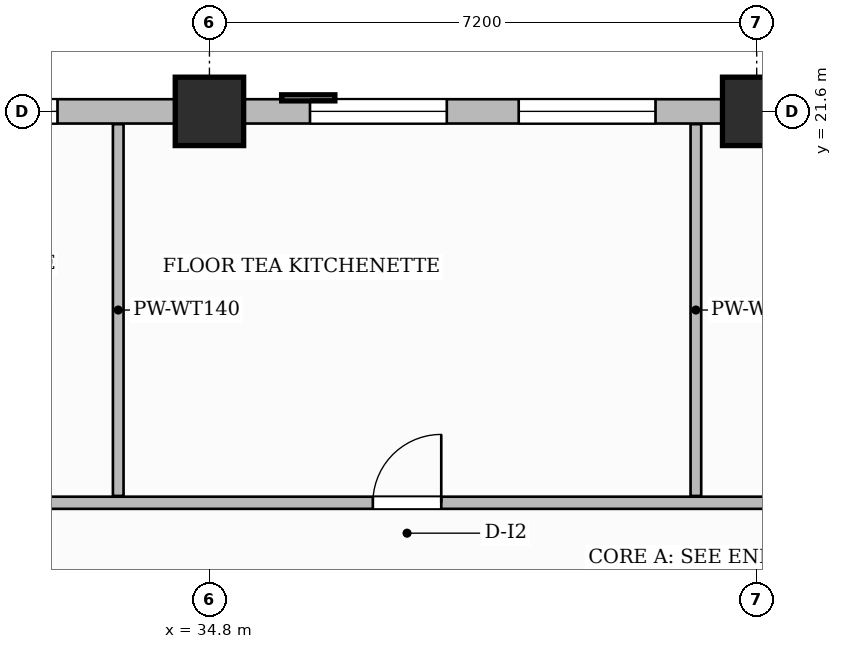
"""IFC4 building model, lengths in metres.
Left out: names, types, materials, properties, quantities, classifications, styles, units other than length and angle.
Written with IfcOpenShell. Run it as: python <this file> out.ifc"""

import sys

from ifc_helpers import new_model, si_unit, direction, frame, frame_2d, origin, origin_2d, place, context, subcontext, project, spatial, rectangle, extrude, source, transform, mapped, element, fill, save


model = new_model("IFC4")
c1 = context("Model", 3, precision=1e-05, world=origin(), true_north=direction((0.0, 1.0)))
c2 = subcontext(c1, "Body", "Model", "MODEL_VIEW")
j1 = project(units=[si_unit("LENGTHUNIT", "METRE"), si_unit("PLANEANGLEUNIT", "RADIAN")], contexts=[c1])
p1 = place(None, origin())
s1 = spatial("IfcSite", under=j1, at=p1, CompositionType="ELEMENT")
p2 = place(p1, origin())
s2 = spatial("IfcBuilding", under=s1, at=p2, CompositionType="ELEMENT")
p3 = place(p2, frame((0.0, 0.0, 248.1)))
s3 = spatial("IfcBuildingStorey", under=s2, at=p3, CompositionType="ELEMENT", Elevation=248.1)
m1 = source(origin(), c2, "Body", "SweptSolid", [
    extrude(rectangle(XDim=0.9, YDim=0.9, at=origin_2d()), origin(), (0.0, 0.0, 1.0), 3.85),
])
for number, where, z_axis, x_axis in (
    (1, (34.8, 21.6, 0.0), (0.0, 0.0, 1.0), (1.0, 0.0, 0.0)),
    (2, (42.0, 21.6, 0.0), (0.0, 0.0, 1.0), (1.0, 0.0, 0.0)),
):
    element("IfcColumn", number, at=place(p3, frame(where, z_axis=z_axis, x_axis=x_axis)), inside=s3, PredefinedType="COLUMN", context=c2, shape_type="MappedRepresentation", body=[
        mapped(m1, transform((0.0, 0.0, 0.0), scale=1.0)),
    ])
p4 = place(p3, frame((30.29, 16.45, 0.0), z_axis=(0.0, 0.0, 1.0), x_axis=(1.0, 0.0, 0.0)))
e3 = element("IfcWall", 3, at=p4, inside=s3, PredefinedType="PARTITIONING", context=c2, shape_type="SweptSolid", body=[
    extrude(rectangle(XDim=19.37, YDim=0.16, at=frame_2d((9.685, 0.0))), origin(), (0.0, 0.0, 1.0), 3.6),
])
p5 = place(p4, frame((1.185, 0.0, 0.0)))
e4 = element("IfcOpeningElement", 4, at=p5, cuts=e3, PredefinedType="OPENING", context=c2, shape_type="SweptSolid", body=[
    extrude(rectangle(XDim=0.85, YDim=2.1, at=frame_2d((0.425, 1.05))), frame((0.0, 0.09, 0.0), z_axis=(0.0, -1.0, 0.0), x_axis=(1.0, 0.0, 0.0)), (0.0, 0.0, 1.0), 0.18),
])
p6 = place(p4, frame((6.66, 0.0, 0.0)))
e5 = element("IfcOpeningElement", 5, at=p6, cuts=e3, PredefinedType="OPENING", context=c2, shape_type="SweptSolid", body=[
    extrude(rectangle(XDim=0.9, YDim=2.15, at=frame_2d((0.45, 1.075))), frame((0.0, 0.09, 0.0), z_axis=(0.0, -1.0, 0.0), x_axis=(1.0, 0.0, 0.0)), (0.0, 0.0, 1.0), 0.18),
])
p7 = place(p4, frame((14.46, 0.0, 0.0)))
e6 = element("IfcOpeningElement", 6, at=p7, cuts=e3, PredefinedType="OPENING", context=c2, shape_type="SweptSolid", body=[
    extrude(rectangle(XDim=1.4, YDim=2.35, at=frame_2d((0.7, 1.175))), frame((0.0, 0.09, 0.0), z_axis=(0.0, -1.0, 0.0), x_axis=(1.0, 0.0, 0.0)), (0.0, 0.0, 1.0), 0.18),
])
for number, where, z_axis, x_axis in (
    (7, (33.6, 16.54, 0.0), (0.0, 0.0, 1.0), (0.0, 1.0, 0.0)),
    (8, (41.2, 16.54, 0.0), (0.0, 0.0, 1.0), (0.0, 1.0, 0.0)),
):
    element("IfcWall", number, at=place(p3, frame(where, z_axis=z_axis, x_axis=x_axis)), inside=s3, PredefinedType="PARTITIONING", context=c2, shape_type="SweptSolid", body=[
        extrude(rectangle(XDim=4.892, YDim=0.14, at=frame_2d((2.446, 0.0))), origin(), (0.0, 0.0, 1.0), 3.6),
    ])
p8 = place(p3, frame((14.4, 21.6, 0.0), z_axis=(0.0, 0.0, 1.0), x_axis=(1.0, 0.0, 0.0)))
e9 = element("IfcWall", 9, at=p8, inside=s3, PredefinedType="SOLIDWALL", context=c2, shape_type="SweptSolid", body=[
    extrude(rectangle(XDim=35.4, YDim=0.32, at=frame_2d((17.7, 0.0))), origin(), (0.0, 0.0, 1.0), 3.135),
])
p9 = place(p8, frame((0.85, 0.0, 0.0)))
e10 = element("IfcOpeningElement", 10, at=p9, cuts=e9, PredefinedType="OPENING", context=c2, shape_type="SweptSolid", body=[
    extrude(rectangle(XDim=1.2, YDim=2.2, at=frame_2d((0.6, 1.1))), frame((0.0, 0.17, 0.0), z_axis=(0.0, -1.0, 0.0), x_axis=(1.0, 0.0, 0.0)), (0.0, 0.0, 1.0), 0.34),
])
p10 = place(p8, frame((2.771, 0.0, 0.8)))
e11 = element("IfcOpeningElement", 11, at=p10, cuts=e9, PredefinedType="OPENING", context=c2, shape_type="SweptSolid", body=[
    extrude(rectangle(XDim=1.4, YDim=1.85, at=frame_2d((0.7, 0.925))), frame((0.0, 0.17, 0.0), z_axis=(0.0, -1.0, 0.0), x_axis=(1.0, 0.0, 0.0)), (0.0, 0.0, 1.0), 0.34),
])
p11 = place(p8, frame((4.929, 0.0, 0.8)))
e12 = element("IfcOpeningElement", 12, at=p11, cuts=e9, PredefinedType="OPENING", context=c2, shape_type="SweptSolid", body=[
    extrude(rectangle(XDim=1.15, YDim=1.8, at=frame_2d((0.575, 0.9))), frame((0.0, 0.17, 0.0), z_axis=(0.0, -1.0, 0.0), x_axis=(1.0, 0.0, 0.0)), (0.0, 0.0, 1.0), 0.34),
])
p12 = place(p8, frame((8.496, 0.0, 0.8)))
e13 = element("IfcOpeningElement", 13, at=p12, cuts=e9, PredefinedType="OPENING", context=c2, shape_type="SweptSolid", body=[
    extrude(rectangle(XDim=1.8, YDim=1.85, at=frame_2d((0.9, 0.925))), frame((0.0, 0.17, 0.0), z_axis=(0.0, -1.0, 0.0), x_axis=(1.0, 0.0, 0.0)), (0.0, 0.0, 1.0), 0.34),
])
p13 = place(p8, frame((11.304, 0.0, 0.8)))
e14 = element("IfcOpeningElement", 14, at=p13, cuts=e9, PredefinedType="OPENING", context=c2, shape_type="SweptSolid", body=[
    extrude(rectangle(XDim=1.8, YDim=1.85, at=frame_2d((0.9, 0.925))), frame((0.0, 0.17, 0.0), z_axis=(0.0, -1.0, 0.0), x_axis=(1.0, 0.0, 0.0)), (0.0, 0.0, 1.0), 0.34),
])
p14 = place(p8, frame((16.601, 0.0, 0.8)))
e15 = element("IfcOpeningElement", 15, at=p14, cuts=e9, PredefinedType="OPENING", context=c2, shape_type="SweptSolid", body=[
    extrude(rectangle(XDim=1.8, YDim=1.85, at=frame_2d((0.9, 0.925))), frame((0.0, 0.17, 0.0), z_axis=(0.0, -1.0, 0.0), x_axis=(1.0, 0.0, 0.0)), (0.0, 0.0, 1.0), 0.34),
])
p15 = place(p8, frame((21.723, 0.0, 0.8)))
e16 = element("IfcOpeningElement", 16, at=p15, cuts=e9, PredefinedType="OPENING", context=c2, shape_type="SweptSolid", body=[
    extrude(rectangle(XDim=1.8, YDim=1.85, at=frame_2d((0.9, 0.925))), frame((0.0, 0.17, 0.0), z_axis=(0.0, -1.0, 0.0), x_axis=(1.0, 0.0, 0.0)), (0.0, 0.0, 1.0), 0.34),
])
p16 = place(p8, frame((24.469, 0.0, 0.8)))
e17 = element("IfcOpeningElement", 17, at=p16, cuts=e9, PredefinedType="OPENING", context=c2, shape_type="SweptSolid", body=[
    extrude(rectangle(XDim=1.8, YDim=1.85, at=frame_2d((0.9, 0.925))), frame((0.0, 0.17, 0.0), z_axis=(0.0, -1.0, 0.0), x_axis=(1.0, 0.0, 0.0)), (0.0, 0.0, 1.0), 0.34),
])
p17 = place(p8, frame((29.075, 0.0, 0.8)))
e18 = element("IfcOpeningElement", 18, at=p17, cuts=e9, PredefinedType="OPENING", context=c2, shape_type="SweptSolid", body=[
    extrude(rectangle(XDim=1.8, YDim=1.85, at=frame_2d((0.9, 0.925))), frame((0.0, 0.17, 0.0), z_axis=(0.0, -1.0, 0.0), x_axis=(1.0, 0.0, 0.0)), (0.0, 0.0, 1.0), 0.34),
])
p18 = place(p8, frame((32.125, 0.0, 0.8)))
e19 = element("IfcOpeningElement", 19, at=p18, cuts=e9, PredefinedType="OPENING", context=c2, shape_type="SweptSolid", body=[
    extrude(rectangle(XDim=1.8, YDim=1.85, at=frame_2d((0.9, 0.925))), frame((0.0, 0.17, 0.0), z_axis=(0.0, -1.0, 0.0), x_axis=(1.0, 0.0, 0.0)), (0.0, 0.0, 1.0), 0.34),
])
m2 = source(origin(), c2, "Body", "SweptSolid", [
    extrude(rectangle(XDim=0.9, YDim=2.15, at=frame_2d((0.45, 1.075))), frame((0.0, 0.025, 0.0), z_axis=(0.0, -1.0, 0.0), x_axis=(1.0, 0.0, 0.0)), (0.0, 0.0, 1.0), 0.05),
])
p19 = place(p6, origin())
e20 = element("IfcDoor", 20, at=p19, inside=s3, OperationType="SINGLE_SWING_RIGHT", PredefinedType="DOOR", context=c2, shape_type="MappedRepresentation", body=[
    mapped(m2, transform((0.0, 0.0, 0.0), scale=1.0)),
])
fill(e5, e20)
m3 = source(origin(), c2, "Body", "SweptSolid", [
    extrude(rectangle(XDim=1.8, YDim=1.85, at=frame_2d((0.9, 0.925))), frame((0.0, 0.03, 0.0), z_axis=(0.0, -1.0, 0.0), x_axis=(1.0, 0.0, 0.0)), (0.0, 0.0, 1.0), 0.06),
])
p20 = place(p14, origin())
e21 = element("IfcWindow", 21, at=p20, inside=s3, PartitioningType="DOUBLE_PANEL_VERTICAL", PredefinedType="WINDOW", context=c2, shape_type="MappedRepresentation", body=[
    mapped(m3, transform((0.0, 0.0, 0.0), scale=1.0)),
])
fill(e15, e21)
p21 = place(p15, origin())
e22 = element("IfcWindow", 22, at=p21, inside=s3, PartitioningType="DOUBLE_PANEL_VERTICAL", PredefinedType="WINDOW", context=c2, shape_type="MappedRepresentation", body=[
    mapped(m3, transform((0.0, 0.0, 0.0), scale=1.0)),
])
fill(e16, e22)
p22 = place(p16, origin())
e23 = element("IfcWindow", 23, at=p22, inside=s3, PartitioningType="DOUBLE_PANEL_VERTICAL", PredefinedType="WINDOW", context=c2, shape_type="MappedRepresentation", body=[
    mapped(m3, transform((0.0, 0.0, 0.0), scale=1.0)),
])
fill(e17, e23)
save(model, sys.argv[1])
